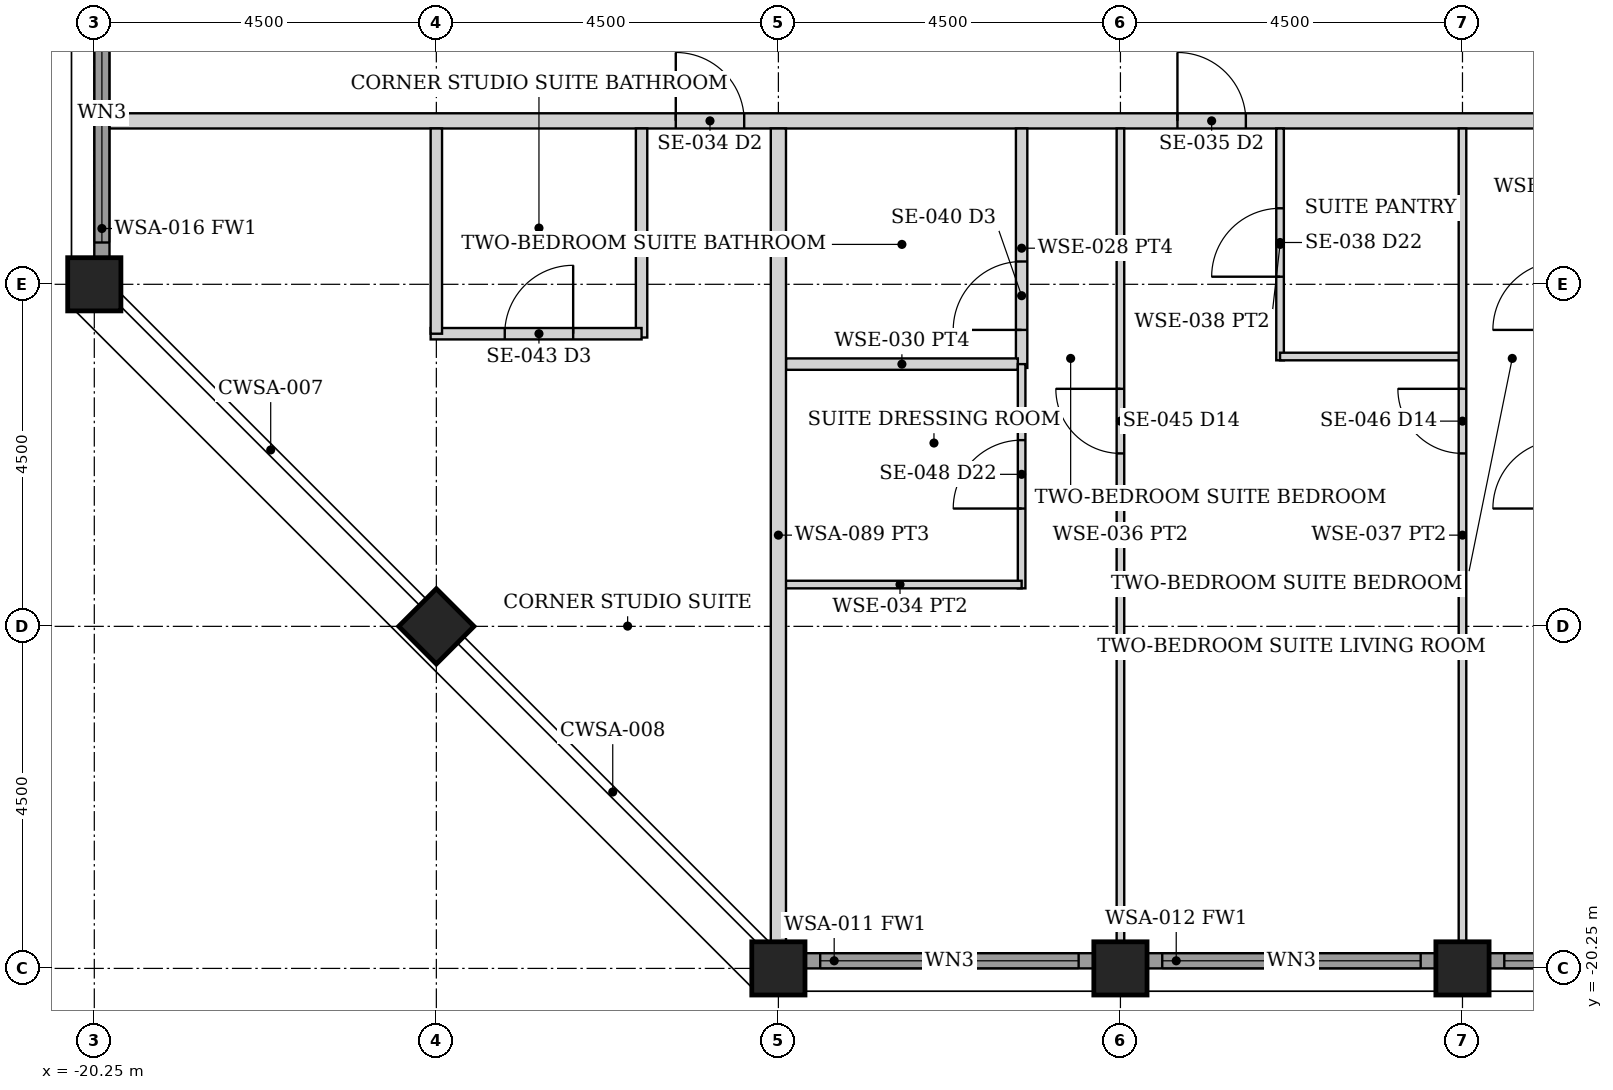
"""IFC4 building model, lengths in metres.
Left out: names, types, materials, properties, quantities, classifications, styles, units other than length and angle.
Written with IfcOpenShell. Run it as: python <this file> out.ifc"""

import sys

from ifc_helpers import new_model, si_unit, direction, frame, frame_2d, origin, origin_2d, place, context, subcontext, project, spatial, rectangle, hollow_rectangle, extrude, element, fill, save


model = new_model("IFC4")
c1 = context("Model", 3, precision=1e-05, world=origin(), true_north=direction((0.0, 1.0)))
c2 = subcontext(c1, "Body", "Model", "MODEL_VIEW")
j1 = project(units=[si_unit("LENGTHUNIT", "METRE"), si_unit("PLANEANGLEUNIT", "RADIAN")], contexts=[c1])
p1 = place(None, origin())
s1 = spatial("IfcSite", under=j1, at=p1, CompositionType="ELEMENT")
p2 = place(p1, origin())
s2 = spatial("IfcBuilding", under=s1, at=p2, CompositionType="ELEMENT")
p3 = place(p2, frame((0.0, 0.0, 245.8)))
s3 = spatial("IfcBuildingStorey", under=s2, at=p3, CompositionType="ELEMENT", Elevation=245.8)
for number, where, z_axis, x_axis in (
    (1, (-11.25, -20.25, 0.0), (0.0, 0.0, 1.0), (0.0, 1.0, 0.0)),
    (2, (-20.25, -11.25, 0.0), (0.0, 0.0, 1.0), (1.0, 0.0, 0.0)),
    (3, (-6.75, -20.25, 0.0), (0.0, 0.0, 1.0), (0.0, 1.0, 0.0)),
    (4, (-2.25, -20.25, 0.0), (0.0, 0.0, 1.0), (0.0, 1.0, 0.0)),
    (5, (-15.75, -15.75, 0.0), (0.0, 0.0, 1.0), (0.707, 0.707, 0.0)),
):
    element("IfcColumn", number, at=place(p3, frame(where, z_axis=z_axis, x_axis=x_axis)), inside=s3, PredefinedType="COLUMN", context=c2, shape_type="SweptSolid", body=[
        extrude(hollow_rectangle(XDim=0.7, YDim=0.7, WallThickness=0.035, at=origin_2d()), origin(), (0.0, 0.0, 1.0), 3.75),
    ])
p4 = place(p3, frame((-10.895, -20.15, 0.0), z_axis=(0.0, 0.0, 1.0), x_axis=(1.0, 0.0, 0.0)))
e6 = element("IfcWall", 6, at=p4, inside=s3, PredefinedType="SOLIDWALL", context=c2, shape_type="SweptSolid", body=[
    extrude(rectangle(XDim=3.79, YDim=0.2, at=frame_2d((1.895, 0.0))), origin(), (0.0, 0.0, 1.0), 2.629),
])
p5 = place(p4, frame((0.195, 0.0, 0.3)))
e7 = element("IfcOpeningElement", 7, at=p5, cuts=e6, PredefinedType="OPENING", context=c2, shape_type="SweptSolid", body=[
    extrude(rectangle(XDim=3.4, YDim=2.179, at=frame_2d((1.7, 1.089))), frame((0.0, 0.11, 0.0), z_axis=(0.0, -1.0, 0.0), x_axis=(1.0, 0.0, 0.0)), (0.0, 0.0, 1.0), 0.22),
])
p6 = place(p3, frame((-6.395, -20.15, 0.0), z_axis=(0.0, 0.0, 1.0), x_axis=(1.0, 0.0, 0.0)))
e8 = element("IfcWall", 8, at=p6, inside=s3, PredefinedType="SOLIDWALL", context=c2, shape_type="SweptSolid", body=[
    extrude(rectangle(XDim=3.79, YDim=0.2, at=frame_2d((1.895, 0.0))), origin(), (0.0, 0.0, 1.0), 2.629),
])
p7 = place(p6, frame((0.195, 0.0, 0.3)))
e9 = element("IfcOpeningElement", 9, at=p7, cuts=e8, PredefinedType="OPENING", context=c2, shape_type="SweptSolid", body=[
    extrude(rectangle(XDim=3.4, YDim=2.179, at=frame_2d((1.7, 1.089))), frame((0.0, 0.11, 0.0), z_axis=(0.0, -1.0, 0.0), x_axis=(1.0, 0.0, 0.0)), (0.0, 0.0, 1.0), 0.22),
])
p8 = place(p3, frame((-1.895, -20.15, 0.0), z_axis=(0.0, 0.0, 1.0), x_axis=(1.0, 0.0, 0.0)))
e10 = element("IfcWall", 10, at=p8, inside=s3, PredefinedType="SOLIDWALL", context=c2, shape_type="SweptSolid", body=[
    extrude(rectangle(XDim=3.79, YDim=0.2, at=frame_2d((1.895, 0.0))), origin(), (0.0, 0.0, 1.0), 2.629),
])
p9 = place(p8, frame((0.195, 0.0, 0.3)))
e11 = element("IfcOpeningElement", 11, at=p9, cuts=e10, PredefinedType="OPENING", context=c2, shape_type="SweptSolid", body=[
    extrude(rectangle(XDim=3.4, YDim=2.179, at=frame_2d((1.7, 1.089))), frame((0.0, 0.11, 0.0), z_axis=(0.0, -1.0, 0.0), x_axis=(1.0, 0.0, 0.0)), (0.0, 0.0, 1.0), 0.22),
])
p10 = place(p3, frame((-20.15, -10.895, 0.0), z_axis=(0.0, 0.0, 1.0), x_axis=(0.0, 1.0, 0.0)))
e12 = element("IfcWall", 12, at=p10, inside=s3, PredefinedType="SOLIDWALL", context=c2, shape_type="SweptSolid", body=[
    extrude(rectangle(XDim=3.79, YDim=0.2, at=frame_2d((1.895, 0.0))), origin(), (0.0, 0.0, 1.0), 2.629),
])
p11 = place(p10, frame((0.195, 0.0, 0.3)))
e13 = element("IfcOpeningElement", 13, at=p11, cuts=e12, PredefinedType="OPENING", context=c2, shape_type="SweptSolid", body=[
    extrude(rectangle(XDim=3.4, YDim=2.179, at=frame_2d((1.7, 1.089))), frame((0.0, 0.11, 0.0), z_axis=(0.0, -1.0, 0.0), x_axis=(1.0, 0.0, 0.0)), (0.0, 0.0, 1.0), 0.22),
])
p12 = place(p3, frame((-20.05, -9.1, 0.0), z_axis=(0.0, 0.0, 1.0), x_axis=(1.0, 0.0, 0.0)))
e14 = element("IfcWall", 14, at=p12, inside=s3, PredefinedType="PARTITIONING", context=c2, shape_type="SweptSolid", body=[
    extrude(rectangle(XDim=40.1, YDim=0.2, at=frame_2d((20.05, 0.0))), origin(), (0.0, 0.0, 1.0), 2.629),
])
p13 = place(p12, frame((14.05, 0.0, 0.0)))
e15 = element("IfcOpeningElement", 15, at=p13, cuts=e14, PredefinedType="OPENING", context=c2, shape_type="SweptSolid", body=[
    extrude(rectangle(XDim=0.9, YDim=2.1, at=frame_2d((0.45, 1.05))), frame((0.0, 0.11, 0.0), z_axis=(0.0, -1.0, 0.0), x_axis=(1.0, 0.0, 0.0)), (0.0, 0.0, 1.0), 0.22),
])
p14 = place(p12, frame((23.05, 0.0, 0.0)))
e16 = element("IfcOpeningElement", 16, at=p14, cuts=e14, PredefinedType="OPENING", context=c2, shape_type="SweptSolid", body=[
    extrude(rectangle(XDim=0.9, YDim=2.1, at=frame_2d((0.45, 1.05))), frame((0.0, 0.11, 0.0), z_axis=(0.0, -1.0, 0.0), x_axis=(1.0, 0.0, 0.0)), (0.0, 0.0, 1.0), 0.22),
])
p15 = place(p12, frame((31.75, 0.0, 0.0)))
e17 = element("IfcOpeningElement", 17, at=p15, cuts=e14, PredefinedType="OPENING", context=c2, shape_type="SweptSolid", body=[
    extrude(rectangle(XDim=0.9, YDim=2.1, at=frame_2d((0.45, 1.05))), frame((0.0, 0.11, 0.0), z_axis=(0.0, -1.0, 0.0), x_axis=(1.0, 0.0, 0.0)), (0.0, 0.0, 1.0), 0.22),
])
p16 = place(p12, frame((7.45, 0.0, 0.0)))
e18 = element("IfcOpeningElement", 18, at=p16, cuts=e14, PredefinedType="OPENING", context=c2, shape_type="SweptSolid", body=[
    extrude(rectangle(XDim=0.9, YDim=2.1, at=frame_2d((0.45, 1.05))), frame((0.0, 0.11, 0.0), z_axis=(0.0, -1.0, 0.0), x_axis=(1.0, 0.0, 0.0)), (0.0, 0.0, 1.0), 0.22),
])
p17 = place(p3, frame((-4.65, -12.25, 0.0), z_axis=(0.0, 0.0, 1.0), x_axis=(0.0, 1.0, 0.0)))
e19 = element("IfcWall", 19, at=p17, inside=s3, PredefinedType="PARTITIONING", context=c2, shape_type="SweptSolid", body=[
    extrude(rectangle(XDim=3.05, YDim=0.1, at=frame_2d((1.525, 0.0))), origin(), (0.0, 0.0, 1.0), 2.629),
])
p18 = place(p17, frame((1.1, 0.0, 0.0)))
e20 = element("IfcOpeningElement", 20, at=p18, cuts=e19, PredefinedType="OPENING", context=c2, shape_type="SweptSolid", body=[
    extrude(rectangle(XDim=0.9, YDim=2.1, at=frame_2d((0.45, 1.05))), frame((0.0, 0.06, 0.0), z_axis=(0.0, -1.0, 0.0), x_axis=(1.0, 0.0, 0.0)), (0.0, 0.0, 1.0), 0.12),
])
p19 = place(p3, frame((-4.65, -12.2, 0.0), z_axis=(0.0, 0.0, 1.0), x_axis=(1.0, 0.0, 0.0)))
e21 = element("IfcWall", 21, at=p19, inside=s3, PredefinedType="PARTITIONING", context=c2, shape_type="SweptSolid", body=[
    extrude(rectangle(XDim=2.4, YDim=0.1, at=frame_2d((1.2, 0.0))), origin(), (0.0, 0.0, 1.0), 2.629),
])
p20 = place(p3, frame((-6.75, -19.9, 0.0), z_axis=(0.0, 0.0, 1.0), x_axis=(0.0, 1.0, 0.0)))
e22 = element("IfcWall", 22, at=p20, inside=s3, PredefinedType="PARTITIONING", context=c2, shape_type="SweptSolid", body=[
    extrude(rectangle(XDim=10.7, YDim=0.1, at=frame_2d((5.35, 0.0))), origin(), (0.0, 0.0, 1.0), 2.629),
])
p21 = place(p20, frame((6.425, 0.0, 0.0)))
e23 = element("IfcOpeningElement", 23, at=p21, cuts=e22, PredefinedType="OPENING", context=c2, shape_type="SweptSolid", body=[
    extrude(rectangle(XDim=0.85, YDim=2.1, at=frame_2d((0.425, 1.05))), frame((0.0, 0.06, 0.0), z_axis=(0.0, -1.0, 0.0), x_axis=(1.0, 0.0, 0.0)), (0.0, 0.0, 1.0), 0.12),
])
p22 = place(p3, frame((-8.05, -12.35, 0.0), z_axis=(0.0, 0.0, 1.0), x_axis=(0.0, 1.0, 0.0)))
e24 = element("IfcWall", 24, at=p22, inside=s3, PredefinedType="PARTITIONING", context=c2, shape_type="SweptSolid", body=[
    extrude(rectangle(XDim=3.15, YDim=0.15, at=frame_2d((1.575, 0.0))), origin(), (0.0, 0.0, 1.0), 2.629),
])
p23 = place(p22, frame((0.5, 0.0, 0.0)))
e25 = element("IfcOpeningElement", 25, at=p23, cuts=e24, PredefinedType="OPENING", context=c2, shape_type="SweptSolid", body=[
    extrude(rectangle(XDim=0.9, YDim=2.1, at=frame_2d((0.45, 1.05))), frame((0.0, 0.085, 0.0), z_axis=(0.0, -1.0, 0.0), x_axis=(1.0, 0.0, 0.0)), (0.0, 0.0, 1.0), 0.17),
])
p24 = place(p3, frame((-11.15, -12.3, 0.0), z_axis=(0.0, 0.0, 1.0), x_axis=(1.0, 0.0, 0.0)))
e26 = element("IfcWall", 26, at=p24, inside=s3, PredefinedType="PARTITIONING", context=c2, shape_type="SweptSolid", body=[
    extrude(rectangle(XDim=3.05, YDim=0.15, at=frame_2d((1.525, 0.0))), origin(), (0.0, 0.0, 1.0), 2.629),
])
p25 = place(p3, frame((-8.05, -15.25, 0.0), z_axis=(0.0, 0.0, 1.0), x_axis=(0.0, 1.0, 0.0)))
e27 = element("IfcWall", 27, at=p25, inside=s3, PredefinedType="PARTITIONING", context=c2, shape_type="SweptSolid", body=[
    extrude(rectangle(XDim=2.95, YDim=0.1, at=frame_2d((1.475, 0.0))), origin(), (0.0, 0.0, 1.0), 2.629),
])
p26 = place(p25, frame((1.05, 0.0, 0.0)))
e28 = element("IfcOpeningElement", 28, at=p26, cuts=e27, PredefinedType="OPENING", context=c2, shape_type="SweptSolid", body=[
    extrude(rectangle(XDim=0.9, YDim=2.1, at=frame_2d((0.45, 1.05))), frame((0.0, 0.06, 0.0), z_axis=(0.0, -1.0, 0.0), x_axis=(1.0, 0.0, 0.0)), (0.0, 0.0, 1.0), 0.12),
])
p27 = place(p3, frame((-11.25, -15.2, 0.0), z_axis=(0.0, 0.0, 1.0), x_axis=(1.0, 0.0, 0.0)))
e29 = element("IfcWall", 29, at=p27, inside=s3, PredefinedType="PARTITIONING", context=c2, shape_type="SweptSolid", body=[
    extrude(rectangle(XDim=3.2, YDim=0.1, at=frame_2d((1.6, 0.0))), origin(), (0.0, 0.0, 1.0), 2.629),
])
p28 = place(p3, frame((-2.25, -19.9, 0.0), z_axis=(0.0, 0.0, 1.0), x_axis=(0.0, 1.0, 0.0)))
e30 = element("IfcWall", 30, at=p28, inside=s3, PredefinedType="PARTITIONING", context=c2, shape_type="SweptSolid", body=[
    extrude(rectangle(XDim=10.7, YDim=0.1, at=frame_2d((5.35, 0.0))), origin(), (0.0, 0.0, 1.0), 2.629),
])
p29 = place(p28, frame((6.425, 0.0, 0.0)))
e31 = element("IfcOpeningElement", 31, at=p29, cuts=e30, PredefinedType="OPENING", context=c2, shape_type="SweptSolid", body=[
    extrude(rectangle(XDim=0.85, YDim=2.1, at=frame_2d((0.425, 1.05))), frame((0.0, 0.06, 0.0), z_axis=(0.0, -1.0, 0.0), x_axis=(1.0, 0.0, 0.0)), (0.0, 0.0, 1.0), 0.12),
])
p30 = place(p3, frame((-11.25, -19.9, 0.0), z_axis=(0.0, 0.0, 1.0), x_axis=(0.0, 1.0, 0.0)))
e32 = element("IfcWall", 32, at=p30, inside=s3, PredefinedType="PARTITIONING", context=c2, shape_type="SweptSolid", body=[
    extrude(rectangle(XDim=10.7, YDim=0.2, at=frame_2d((5.35, 0.0))), origin(), (0.0, 0.0, 1.0), 2.629),
])
p31 = place(p3, frame((-13.05, -11.95, 0.0), z_axis=(0.0, 0.0, 1.0), x_axis=(0.0, 1.0, 0.0)))
e33 = element("IfcWall", 33, at=p31, inside=s3, PredefinedType="PARTITIONING", context=c2, shape_type="SweptSolid", body=[
    extrude(rectangle(XDim=2.75, YDim=0.15, at=frame_2d((1.375, 0.0))), origin(), (0.0, 0.0, 1.0), 2.629),
])
p32 = place(p3, frame((-15.825, -11.9, 0.0), z_axis=(0.0, 0.0, 1.0), x_axis=(1.0, 0.0, 0.0)))
e34 = element("IfcWall", 34, at=p32, inside=s3, PredefinedType="PARTITIONING", context=c2, shape_type="SweptSolid", body=[
    extrude(rectangle(XDim=2.775, YDim=0.15, at=frame_2d((1.387, 0.0))), origin(), (0.0, 0.0, 1.0), 2.629),
])
p33 = place(p32, frame((0.975, 0.0, 0.0)))
e35 = element("IfcOpeningElement", 35, at=p33, cuts=e34, PredefinedType="OPENING", context=c2, shape_type="SweptSolid", body=[
    extrude(rectangle(XDim=0.9, YDim=2.1, at=frame_2d((0.45, 1.05))), frame((0.0, 0.085, 0.0), z_axis=(0.0, -1.0, 0.0), x_axis=(1.0, 0.0, 0.0)), (0.0, 0.0, 1.0), 0.17),
])
p34 = place(p3, frame((-15.75, -11.9, 0.0), z_axis=(0.0, 0.0, 1.0), x_axis=(0.0, 1.0, 0.0)))
e36 = element("IfcWall", 36, at=p34, inside=s3, PredefinedType="PARTITIONING", context=c2, shape_type="SweptSolid", body=[
    extrude(rectangle(XDim=2.7, YDim=0.15, at=frame_2d((1.35, 0.0))), origin(), (0.0, 0.0, 1.0), 2.629),
])
p35 = place(p5, origin())
e37 = element("IfcWindow", 37, at=p35, inside=s3, PartitioningType="SINGLE_PANEL", PredefinedType="WINDOW", context=c2, shape_type="SweptSolid", body=[
    extrude(rectangle(XDim=3.4, YDim=2.179, at=frame_2d((1.7, 1.089))), frame((0.0, 0.03, 0.0), z_axis=(0.0, -1.0, 0.0), x_axis=(1.0, 0.0, 0.0)), (0.0, 0.0, 1.0), 0.06),
])
fill(e7, e37)
p36 = place(p7, origin())
e38 = element("IfcWindow", 38, at=p36, inside=s3, PartitioningType="SINGLE_PANEL", PredefinedType="WINDOW", context=c2, shape_type="SweptSolid", body=[
    extrude(rectangle(XDim=3.4, YDim=2.179, at=frame_2d((1.7, 1.089))), frame((0.0, 0.03, 0.0), z_axis=(0.0, -1.0, 0.0), x_axis=(1.0, 0.0, 0.0)), (0.0, 0.0, 1.0), 0.06),
])
fill(e9, e38)
p37 = place(p9, origin())
e39 = element("IfcWindow", 39, at=p37, inside=s3, PartitioningType="SINGLE_PANEL", PredefinedType="WINDOW", context=c2, shape_type="SweptSolid", body=[
    extrude(rectangle(XDim=3.4, YDim=2.179, at=frame_2d((1.7, 1.089))), frame((0.0, 0.03, 0.0), z_axis=(0.0, -1.0, 0.0), x_axis=(1.0, 0.0, 0.0)), (0.0, 0.0, 1.0), 0.06),
])
fill(e11, e39)
p38 = place(p11, origin())
e40 = element("IfcWindow", 40, at=p38, inside=s3, PartitioningType="SINGLE_PANEL", PredefinedType="WINDOW", context=c2, shape_type="SweptSolid", body=[
    extrude(rectangle(XDim=3.4, YDim=2.179, at=frame_2d((1.7, 1.089))), frame((0.0, 0.03, 0.0), z_axis=(0.0, -1.0, 0.0), x_axis=(1.0, 0.0, 0.0)), (0.0, 0.0, 1.0), 0.06),
])
fill(e13, e40)
p39 = place(p13, origin())
e41 = element("IfcDoor", 41, at=p39, inside=s3, OperationType="SINGLE_SWING_LEFT", PredefinedType="DOOR", context=c2, shape_type="SweptSolid", body=[
    extrude(rectangle(XDim=0.9, YDim=2.1, at=frame_2d((0.45, 1.05))), frame((0.0, 0.025, 0.0), z_axis=(0.0, -1.0, 0.0), x_axis=(1.0, 0.0, 0.0)), (0.0, 0.0, 1.0), 0.05),
])
fill(e15, e41)
p40 = place(p18, origin())
e42 = element("IfcDoor", 42, at=p40, inside=s3, OperationType="SINGLE_SWING_LEFT", PredefinedType="DOOR", context=c2, shape_type="SweptSolid", body=[
    extrude(rectangle(XDim=0.9, YDim=2.1, at=frame_2d((0.45, 1.05))), frame((0.0, 0.025, 0.0), z_axis=(0.0, -1.0, 0.0), x_axis=(1.0, 0.0, 0.0)), (0.0, 0.0, 1.0), 0.05),
])
fill(e20, e42)
p41 = place(p26, origin())
e43 = element("IfcDoor", 43, at=p41, inside=s3, OperationType="SINGLE_SWING_LEFT", PredefinedType="DOOR", context=c2, shape_type="SweptSolid", body=[
    extrude(rectangle(XDim=0.9, YDim=2.1, at=frame_2d((0.45, 1.05))), frame((0.0, 0.025, 0.0), z_axis=(0.0, -1.0, 0.0), x_axis=(1.0, 0.0, 0.0)), (0.0, 0.0, 1.0), 0.05),
])
fill(e28, e43)
p42 = place(p21, origin())
e44 = element("IfcDoor", 44, at=p42, inside=s3, OperationType="SINGLE_SWING_RIGHT", PredefinedType="DOOR", context=c2, shape_type="SweptSolid", body=[
    extrude(rectangle(XDim=0.85, YDim=2.1, at=frame_2d((0.425, 1.05))), frame((0.0, 0.025, 0.0), z_axis=(0.0, -1.0, 0.0), x_axis=(1.0, 0.0, 0.0)), (0.0, 0.0, 1.0), 0.05),
])
fill(e23, e44)
p43 = place(p23, origin())
e45 = element("IfcDoor", 45, at=p43, inside=s3, OperationType="SINGLE_SWING_LEFT", PredefinedType="DOOR", context=c2, shape_type="SweptSolid", body=[
    extrude(rectangle(XDim=0.9, YDim=2.1, at=frame_2d((0.45, 1.05))), frame((0.0, 0.025, 0.0), z_axis=(0.0, -1.0, 0.0), x_axis=(1.0, 0.0, 0.0)), (0.0, 0.0, 1.0), 0.05),
])
fill(e25, e45)
p44 = place(p29, origin())
e46 = element("IfcDoor", 46, at=p44, inside=s3, OperationType="SINGLE_SWING_RIGHT", PredefinedType="DOOR", context=c2, shape_type="SweptSolid", body=[
    extrude(rectangle(XDim=0.85, YDim=2.1, at=frame_2d((0.425, 1.05))), frame((0.0, 0.025, 0.0), z_axis=(0.0, -1.0, 0.0), x_axis=(1.0, 0.0, 0.0)), (0.0, 0.0, 1.0), 0.05),
])
fill(e31, e46)
p45 = place(p16, origin())
e47 = element("IfcDoor", 47, at=p45, inside=s3, OperationType="SINGLE_SWING_LEFT", PredefinedType="DOOR", context=c2, shape_type="SweptSolid", body=[
    extrude(rectangle(XDim=0.9, YDim=2.1, at=frame_2d((0.45, 1.05))), frame((0.0, 0.025, 0.0), z_axis=(0.0, -1.0, 0.0), x_axis=(1.0, 0.0, 0.0)), (0.0, 0.0, 1.0), 0.05),
])
fill(e18, e47)
p46 = place(p33, origin())
e48 = element("IfcDoor", 48, at=p46, inside=s3, OperationType="SINGLE_SWING_RIGHT", PredefinedType="DOOR", context=c2, shape_type="SweptSolid", body=[
    extrude(rectangle(XDim=0.9, YDim=2.1, at=frame_2d((0.45, 1.05))), frame((0.0, 0.025, 0.0), z_axis=(0.0, -1.0, 0.0), x_axis=(1.0, 0.0, 0.0)), (0.0, 0.0, 1.0), 0.05),
])
fill(e35, e48)
save(model, sys.argv[1])
